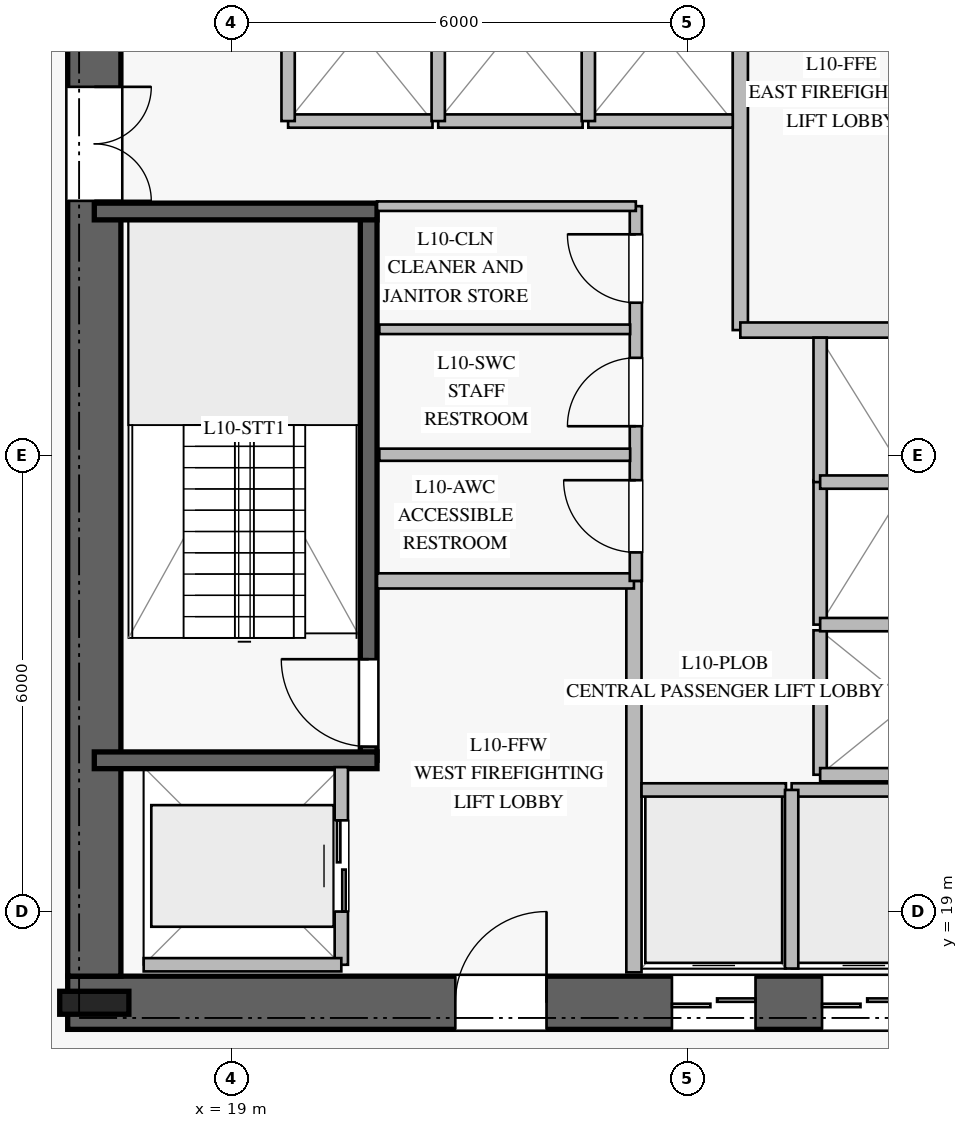
"""IFC4 building model, lengths in metres.
Left out: names, types, materials, properties, quantities, classifications, styles, units other than length and angle.
Written with IfcOpenShell. Run it as: python <this file> out.ifc"""

import sys

from ifc_helpers import new_model, si_unit, direction, frame, frame_2d, origin, origin_2d, place, context, subcontext, project, spatial, rectangle, i_section, extrude, element, fill, save


model = new_model("IFC4")
c1 = context("Model", 3, precision=1e-05, world=origin(), true_north=direction((0.0, 1.0)))
c2 = subcontext(c1, "Body", "Model", "MODEL_VIEW")
j1 = project(units=[si_unit("LENGTHUNIT", "METRE"), si_unit("PLANEANGLEUNIT", "RADIAN")], contexts=[c1])
p1 = place(None, origin())
s1 = spatial("IfcSite", under=j1, at=p1, CompositionType="ELEMENT")
p2 = place(p1, origin())
s2 = spatial("IfcBuilding", under=s1, at=p2, CompositionType="ELEMENT")
p3 = place(p2, frame((0.0, 0.0, 44.0)))
s3 = spatial("IfcBuildingStorey", under=s2, at=p3, CompositionType="ELEMENT", Elevation=44.0)
p4 = place(p3, frame((16.85, 17.8, 0.0), z_axis=(0.0, 0.0, 1.0), x_axis=(1.0, 0.0, 0.0)))
e1 = element("IfcWall", 1, at=p4, inside=s3, PredefinedType="SHEAR", context=c2, shape_type="SweptSolid", body=[
    extrude(rectangle(XDim=16.3, YDim=0.7, at=frame_2d((8.15, 0.0))), origin(), (0.0, 0.0, 1.0), 3.76),
])
p5 = place(p4, frame((5.1, 0.0, 0.0)))
e2 = element("IfcOpeningElement", 2, at=p5, cuts=e1, PredefinedType="OPENING", context=c2, shape_type="SweptSolid", body=[
    extrude(rectangle(XDim=1.2, YDim=2.25, at=frame_2d((0.6, 1.125))), frame((0.0, 0.36, 0.0), z_axis=(0.0, -1.0, 0.0), x_axis=(1.0, 0.0, 0.0)), (0.0, 0.0, 1.0), 0.72),
])
p6 = place(p4, frame((14.05, 0.0, 0.0)))
e3 = element("IfcOpeningElement", 3, at=p6, cuts=e1, PredefinedType="OPENING", context=c2, shape_type="SweptSolid", body=[
    extrude(rectangle(XDim=0.9, YDim=2.1, at=frame_2d((0.45, 1.05))), frame((0.0, 0.36, 0.0), z_axis=(0.0, -1.0, 0.0), x_axis=(1.0, 0.0, 0.0)), (0.0, 0.0, 1.0), 0.72),
])
p7 = place(p4, frame((7.95, 0.0, 0.0)))
e4 = element("IfcOpeningElement", 4, at=p7, cuts=e1, PredefinedType="OPENING", context=c2, shape_type="SweptSolid", body=[
    extrude(rectangle(XDim=1.1, YDim=2.2, at=frame_2d((0.55, 1.1))), frame((0.0, 0.36, 0.0), z_axis=(0.0, -1.0, 0.0), x_axis=(1.0, 0.0, 0.0)), (0.0, 0.0, 1.0), 0.72),
])
p8 = place(p4, frame((9.925, 0.0, 0.0)))
e5 = element("IfcOpeningElement", 5, at=p8, cuts=e1, PredefinedType="OPENING", context=c2, shape_type="SweptSolid", body=[
    extrude(rectangle(XDim=1.1, YDim=2.2, at=frame_2d((0.55, 1.1))), frame((0.0, 0.36, 0.0), z_axis=(0.0, -1.0, 0.0), x_axis=(1.0, 0.0, 0.0)), (0.0, 0.0, 1.0), 0.72),
])
p9 = place(p4, frame((11.9, 0.0, 0.0)))
e6 = element("IfcOpeningElement", 6, at=p9, cuts=e1, PredefinedType="OPENING", context=c2, shape_type="SweptSolid", body=[
    extrude(rectangle(XDim=1.1, YDim=2.2, at=frame_2d((0.55, 1.1))), frame((0.0, 0.36, 0.0), z_axis=(0.0, -1.0, 0.0), x_axis=(1.0, 0.0, 0.0)), (0.0, 0.0, 1.0), 0.72),
])
p10 = place(p3, frame((17.2, 31.85, 0.0), z_axis=(0.0, 0.0, 1.0), x_axis=(0.0, -1.0, 0.0)))
e7 = element("IfcWall", 7, at=p10, inside=s3, PredefinedType="SHEAR", context=c2, shape_type="SweptSolid", body=[
    extrude(rectangle(XDim=13.7, YDim=0.7, at=frame_2d((6.85, 0.0))), origin(), (0.0, 0.0, 1.0), 3.76),
])
p11 = place(p10, frame((2.0, 0.0, 0.0)))
e8 = element("IfcOpeningElement", 8, at=p11, cuts=e7, PredefinedType="OPENING", context=c2, shape_type="SweptSolid", body=[
    extrude(rectangle(XDim=1.5, YDim=2.2, at=frame_2d((0.75, 1.1))), frame((0.0, 0.36, 0.0), z_axis=(0.0, -1.0, 0.0), x_axis=(1.0, 0.0, 0.0)), (0.0, 0.0, 1.0), 0.72),
])
p12 = place(p3, frame((17.2, 17.8, 0.0), z_axis=(0.0, 0.0, 1.0), x_axis=(1.0, 0.0, 0.0)))
e9 = element("IfcColumn", 9, at=p12, inside=s3, PredefinedType="COLUMN", context=c2, shape_type="SweptSolid", body=[
    extrude(i_section(OverallWidth=0.302, OverallDepth=0.91, WebThickness=0.021, FlangeThickness=0.04, at=origin_2d()), origin(), (0.0, 0.0, 1.0), 4.0),
])
p13 = place(p3, frame((20.81, 20.99, 0.0), z_axis=(0.0, 0.0, 1.0), x_axis=(0.0, 1.0, 0.0)))
e10 = element("IfcWall", 10, at=p13, inside=s3, PredefinedType="SOLIDWALL", context=c2, shape_type="SweptSolid", body=[
    extrude(rectangle(XDim=7.22, YDim=0.22, at=frame_2d((3.61, 0.0))), origin(), (0.0, 0.0, 1.0), 3.76),
])
p14 = place(p13, frame((0.18, 0.0, 0.0)))
e11 = element("IfcOpeningElement", 11, at=p14, cuts=e10, PredefinedType="OPENING", context=c2, shape_type="SweptSolid", body=[
    extrude(rectangle(XDim=1.15, YDim=2.2, at=frame_2d((0.575, 1.1))), frame((0.0, 0.12, 0.0), z_axis=(0.0, -1.0, 0.0), x_axis=(1.0, 0.0, 0.0)), (0.0, 0.0, 1.0), 0.24),
])
for number, where, z_axis, x_axis in (
    (12, (17.2, 20.99, 0.0), (0.0, 0.0, 1.0), (1.0, 0.0, 0.0)),
    (13, (17.2, 28.21, 0.0), (0.0, 0.0, 1.0), (1.0, 0.0, 0.0)),
):
    element("IfcWall", number, at=place(p3, frame(where, z_axis=z_axis, x_axis=x_axis)), inside=s3, PredefinedType="SOLIDWALL", context=c2, shape_type="SweptSolid", body=[
        extrude(rectangle(XDim=3.72, YDim=0.22, at=frame_2d((1.86, 0.0))), origin(), (0.0, 0.0, 1.0), 3.76),
    ])
p15 = place(p3, frame((24.3, 18.2, 0.0), z_axis=(0.0, 0.0, 1.0), x_axis=(0.0, 1.0, 0.0)))
e14 = element("IfcWall", 14, at=p15, inside=s3, PredefinedType="PARTITIONING", context=c2, shape_type="SweptSolid", body=[
    extrude(rectangle(XDim=5.15, YDim=0.2, at=frame_2d((2.575, 0.0))), origin(), (0.0, 0.0, 1.0), 3.76),
])
p16 = place(p3, frame((20.92, 23.35, 0.0), z_axis=(0.0, 0.0, 1.0), x_axis=(1.0, 0.0, 0.0)))
e15 = element("IfcWall", 15, at=p16, inside=s3, PredefinedType="PARTITIONING", context=c2, shape_type="SweptSolid", body=[
    extrude(rectangle(XDim=3.38, YDim=0.2, at=frame_2d((1.69, 0.0))), origin(), (0.0, 0.0, 1.0), 3.76),
])
p17 = place(p3, frame((25.7, 26.65, 0.0), z_axis=(0.0, 0.0, 1.0), x_axis=(0.0, 1.0, 0.0)))
e16 = element("IfcWall", 16, at=p17, inside=s3, PredefinedType="PARTITIONING", context=c2, shape_type="SweptSolid", body=[
    extrude(rectangle(XDim=5.15, YDim=0.2, at=frame_2d((2.575, 0.0))), origin(), (0.0, 0.0, 1.0), 3.76),
])
p18 = place(p3, frame((25.7, 26.65, 0.0), z_axis=(0.0, 0.0, 1.0), x_axis=(1.0, 0.0, 0.0)))
e17 = element("IfcWall", 17, at=p18, inside=s3, PredefinedType="PARTITIONING", context=c2, shape_type="SweptSolid", body=[
    extrude(rectangle(XDim=3.38, YDim=0.2, at=frame_2d((1.69, 0.0))), origin(), (0.0, 0.0, 1.0), 3.76),
])
p19 = place(p3, frame((24.325, 23.35, 0.0), z_axis=(0.0, 0.0, 1.0), x_axis=(0.0, 1.0, 0.0)))
e18 = element("IfcWall", 18, at=p19, inside=s3, PredefinedType="PLUMBINGWALL", context=c2, shape_type="SweptSolid", body=[
    extrude(rectangle(XDim=4.93, YDim=0.16, at=frame_2d((2.465, 0.0))), origin(), (0.0, 0.0, 1.0), 3.76),
])
p20 = place(p19, frame((0.375, 0.0, 0.0)))
e19 = element("IfcOpeningElement", 19, at=p20, cuts=e18, PredefinedType="OPENING", context=c2, shape_type="SweptSolid", body=[
    extrude(rectangle(XDim=0.95, YDim=2.1, at=frame_2d((0.475, 1.05))), frame((0.0, 0.09, 0.0), z_axis=(0.0, -1.0, 0.0), x_axis=(1.0, 0.0, 0.0)), (0.0, 0.0, 1.0), 0.18),
])
p21 = place(p19, frame((2.035, 0.0, 0.0)))
e20 = element("IfcOpeningElement", 20, at=p21, cuts=e18, PredefinedType="OPENING", context=c2, shape_type="SweptSolid", body=[
    extrude(rectangle(XDim=0.9, YDim=2.1, at=frame_2d((0.45, 1.05))), frame((0.0, 0.09, 0.0), z_axis=(0.0, -1.0, 0.0), x_axis=(1.0, 0.0, 0.0)), (0.0, 0.0, 1.0), 0.18),
])
p22 = place(p19, frame((3.66, 0.0, 0.0)))
e21 = element("IfcOpeningElement", 21, at=p22, cuts=e18, PredefinedType="OPENING", context=c2, shape_type="SweptSolid", body=[
    extrude(rectangle(XDim=0.9, YDim=2.1, at=frame_2d((0.45, 1.05))), frame((0.0, 0.09, 0.0), z_axis=(0.0, -1.0, 0.0), x_axis=(1.0, 0.0, 0.0)), (0.0, 0.0, 1.0), 0.18),
])
p23 = place(p3, frame((20.92, 28.28, 0.0), z_axis=(0.0, 0.0, 1.0), x_axis=(1.0, 0.0, 0.0)))
e22 = element("IfcWall", 22, at=p23, inside=s3, PredefinedType="PARTITIONING", context=c2, shape_type="SweptSolid", body=[
    extrude(rectangle(XDim=3.405, YDim=0.125, at=frame_2d((1.703, 0.0))), origin(), (0.0, 0.0, 1.0), 3.76),
])
p24 = place(p3, frame((20.95, 25.01, 0.0), z_axis=(0.0, 0.0, 1.0), x_axis=(1.0, 0.0, 0.0)))
e23 = element("IfcWall", 23, at=p24, inside=s3, PredefinedType="PLUMBINGWALL", context=c2, shape_type="SweptSolid", body=[
    extrude(rectangle(XDim=3.3, YDim=0.16, at=frame_2d((1.65, 0.0))), origin(), (0.0, 0.0, 1.0), 3.76),
])
p25 = place(p3, frame((20.95, 26.66, 0.0), z_axis=(0.0, 0.0, 1.0), x_axis=(1.0, 0.0, 0.0)))
e24 = element("IfcWall", 24, at=p25, inside=s3, PredefinedType="PARTITIONING", context=c2, shape_type="SweptSolid", body=[
    extrude(rectangle(XDim=3.3, YDim=0.125, at=frame_2d((1.65, 0.0))), origin(), (0.0, 0.0, 1.0), 3.76),
])
p26 = place(p3, frame((24.4, 20.6, 0.0), z_axis=(0.0, 0.0, 1.0), x_axis=(1.0, 0.0, 0.0)))
e25 = element("IfcWall", 25, at=p26, inside=s3, PredefinedType="PARTITIONING", context=c2, shape_type="SweptSolid", body=[
    extrude(rectangle(XDim=1.9, YDim=0.175, at=frame_2d((0.95, 0.0))), origin(), (0.0, 0.0, 1.0), 3.76),
])
p27 = place(p3, frame((26.375, 20.6, 0.0), z_axis=(0.0, 0.0, 1.0), x_axis=(1.0, 0.0, 0.0)))
e26 = element("IfcWall", 26, at=p27, inside=s3, PredefinedType="PARTITIONING", context=c2, shape_type="SweptSolid", body=[
    extrude(rectangle(XDim=1.9, YDim=0.175, at=frame_2d((0.95, 0.0))), origin(), (0.0, 0.0, 1.0), 3.76),
])
p28 = place(p3, frame((26.375, 18.25, 0.0), z_axis=(0.0, 0.0, 1.0), x_axis=(0.0, 1.0, 0.0)))
e27 = element("IfcWall", 27, at=p28, inside=s3, PredefinedType="PARTITIONING", context=c2, shape_type="SweptSolid", body=[
    extrude(rectangle(XDim=2.35, YDim=0.175, at=frame_2d((1.175, 0.0))), origin(), (0.0, 0.0, 1.0), 3.76),
])
p29 = place(p3, frame((19.75, 29.4, 0.0), z_axis=(0.0, 0.0, 1.0), x_axis=(1.0, 0.0, 0.0)))
e28 = element("IfcWall", 28, at=p29, inside=s3, PredefinedType="PARTITIONING", context=c2, shape_type="SweptSolid", body=[
    extrude(rectangle(XDim=1.9, YDim=0.175, at=frame_2d((0.95, 0.0))), origin(), (0.0, 0.0, 1.0), 3.76),
])
p30 = place(p3, frame((19.75, 29.4, 0.0), z_axis=(0.0, 0.0, 1.0), x_axis=(0.0, 1.0, 0.0)))
e29 = element("IfcWall", 29, at=p30, inside=s3, PredefinedType="PARTITIONING", context=c2, shape_type="SweptSolid", body=[
    extrude(rectangle(XDim=2.35, YDim=0.175, at=frame_2d((1.175, 0.0))), origin(), (0.0, 0.0, 1.0), 3.76),
])
p31 = place(p3, frame((21.725, 29.4, 0.0), z_axis=(0.0, 0.0, 1.0), x_axis=(1.0, 0.0, 0.0)))
e30 = element("IfcWall", 30, at=p31, inside=s3, PredefinedType="PARTITIONING", context=c2, shape_type="SweptSolid", body=[
    extrude(rectangle(XDim=1.9, YDim=0.175, at=frame_2d((0.95, 0.0))), origin(), (0.0, 0.0, 1.0), 3.76),
])
p32 = place(p3, frame((21.725, 29.4, 0.0), z_axis=(0.0, 0.0, 1.0), x_axis=(0.0, 1.0, 0.0)))
e31 = element("IfcWall", 31, at=p32, inside=s3, PredefinedType="PARTITIONING", context=c2, shape_type="SweptSolid", body=[
    extrude(rectangle(XDim=2.35, YDim=0.175, at=frame_2d((1.175, 0.0))), origin(), (0.0, 0.0, 1.0), 3.76),
])
p33 = place(p3, frame((23.7, 29.4, 0.0), z_axis=(0.0, 0.0, 1.0), x_axis=(1.0, 0.0, 0.0)))
e32 = element("IfcWall", 32, at=p33, inside=s3, PredefinedType="PARTITIONING", context=c2, shape_type="SweptSolid", body=[
    extrude(rectangle(XDim=1.9, YDim=0.175, at=frame_2d((0.95, 0.0))), origin(), (0.0, 0.0, 1.0), 3.76),
])
p34 = place(p3, frame((23.7, 29.4, 0.0), z_axis=(0.0, 0.0, 1.0), x_axis=(0.0, 1.0, 0.0)))
e33 = element("IfcWall", 33, at=p34, inside=s3, PredefinedType="PARTITIONING", context=c2, shape_type="SweptSolid", body=[
    extrude(rectangle(XDim=2.35, YDim=0.175, at=frame_2d((1.175, 0.0))), origin(), (0.0, 0.0, 1.0), 3.76),
])
p35 = place(p3, frame((26.75, 20.8, 0.0), z_axis=(0.0, 0.0, 1.0), x_axis=(0.0, 1.0, 0.0)))
e34 = element("IfcWall", 34, at=p35, inside=s3, PredefinedType="PARTITIONING", context=c2, shape_type="SweptSolid", body=[
    extrude(rectangle(XDim=1.9, YDim=0.175, at=frame_2d((0.95, 0.0))), origin(), (0.0, 0.0, 1.0), 3.76),
])
p36 = place(p3, frame((26.75, 20.8, 0.0), z_axis=(0.0, 0.0, 1.0), x_axis=(1.0, 0.0, 0.0)))
e35 = element("IfcWall", 35, at=p36, inside=s3, PredefinedType="PARTITIONING", context=c2, shape_type="SweptSolid", body=[
    extrude(rectangle(XDim=2.35, YDim=0.175, at=frame_2d((1.175, 0.0))), origin(), (0.0, 0.0, 1.0), 3.76),
])
p37 = place(p3, frame((26.75, 22.775, 0.0), z_axis=(0.0, 0.0, 1.0), x_axis=(0.0, 1.0, 0.0)))
e36 = element("IfcWall", 36, at=p37, inside=s3, PredefinedType="PARTITIONING", context=c2, shape_type="SweptSolid", body=[
    extrude(rectangle(XDim=1.9, YDim=0.175, at=frame_2d((0.95, 0.0))), origin(), (0.0, 0.0, 1.0), 3.76),
])
p38 = place(p3, frame((26.75, 22.775, 0.0), z_axis=(0.0, 0.0, 1.0), x_axis=(1.0, 0.0, 0.0)))
e37 = element("IfcWall", 37, at=p38, inside=s3, PredefinedType="PARTITIONING", context=c2, shape_type="SweptSolid", body=[
    extrude(rectangle(XDim=2.35, YDim=0.175, at=frame_2d((1.175, 0.0))), origin(), (0.0, 0.0, 1.0), 3.76),
])
p39 = place(p3, frame((26.75, 24.65, 0.0), z_axis=(0.0, 0.0, 1.0), x_axis=(0.0, 1.0, 0.0)))
e38 = element("IfcWall", 38, at=p39, inside=s3, PredefinedType="PARTITIONING", context=c2, shape_type="SweptSolid", body=[
    extrude(rectangle(XDim=1.9, YDim=0.175, at=frame_2d((0.95, 0.0))), origin(), (0.0, 0.0, 1.0), 3.76),
])
p40 = place(p3, frame((26.75, 24.65, 0.0), z_axis=(0.0, 0.0, 1.0), x_axis=(1.0, 0.0, 0.0)))
e39 = element("IfcWall", 39, at=p40, inside=s3, PredefinedType="PARTITIONING", context=c2, shape_type="SweptSolid", body=[
    extrude(rectangle(XDim=2.35, YDim=0.175, at=frame_2d((1.175, 0.0))), origin(), (0.0, 0.0, 1.0), 3.76),
])
p41 = place(p3, frame((20.45, 18.3, 0.0), z_axis=(0.0, 0.0, 1.0), x_axis=(0.0, 1.0, 0.0)))
e40 = element("IfcWall", 40, at=p41, inside=s3, PredefinedType="PARTITIONING", context=c2, shape_type="SweptSolid", body=[
    extrude(rectangle(XDim=2.6, YDim=0.175, at=frame_2d((1.3, 0.0))), origin(), (0.0, 0.0, 1.0), 3.76),
])
p42 = place(p41, frame((0.7, 0.0, 0.0)))
e41 = element("IfcOpeningElement", 41, at=p42, cuts=e40, PredefinedType="OPENING", context=c2, shape_type="SweptSolid", body=[
    extrude(rectangle(XDim=1.2, YDim=2.2, at=frame_2d((0.6, 1.1))), frame((0.0, 0.098, 0.0), z_axis=(0.0, -1.0, 0.0), x_axis=(1.0, 0.0, 0.0)), (0.0, 0.0, 1.0), 0.195),
])
p43 = place(p3, frame((17.85, 18.3, 0.0), z_axis=(0.0, 0.0, 1.0), x_axis=(1.0, 0.0, 0.0)))
e42 = element("IfcWall", 42, at=p43, inside=s3, PredefinedType="PARTITIONING", context=c2, shape_type="SweptSolid", body=[
    extrude(rectangle(XDim=2.6, YDim=0.175, at=frame_2d((1.3, 0.0))), origin(), (0.0, 0.0, 1.0), 3.76),
])
p44 = place(p14, origin())
e43 = element("IfcDoor", 43, at=p44, inside=s3, OperationType="SINGLE_SWING_RIGHT", PredefinedType="DOOR", context=c2, shape_type="SweptSolid", body=[
    extrude(rectangle(XDim=1.15, YDim=2.2, at=frame_2d((0.575, 1.1))), frame((0.0, 0.025, 0.0), z_axis=(0.0, -1.0, 0.0), x_axis=(1.0, 0.0, 0.0)), (0.0, 0.0, 1.0), 0.05),
])
fill(e11, e43)
p45 = place(p5, origin())
e44 = element("IfcDoor", 44, at=p45, inside=s3, OperationType="SINGLE_SWING_RIGHT", PredefinedType="DOOR", context=c2, shape_type="SweptSolid", body=[
    extrude(rectangle(XDim=1.2, YDim=2.25, at=frame_2d((0.6, 1.125))), frame((0.0, 0.025, 0.0), z_axis=(0.0, -1.0, 0.0), x_axis=(1.0, 0.0, 0.0)), (0.0, 0.0, 1.0), 0.05),
])
fill(e2, e44)
p46 = place(p11, origin())
e45 = element("IfcDoor", 45, at=p46, inside=s3, OperationType="DOUBLE_DOOR_SINGLE_SWING", PredefinedType="DOOR", context=c2, shape_type="SweptSolid", body=[
    extrude(rectangle(XDim=1.5, YDim=2.2, at=frame_2d((0.75, 1.1))), frame((0.0, 0.025, 0.0), z_axis=(0.0, -1.0, 0.0), x_axis=(1.0, 0.0, 0.0)), (0.0, 0.0, 1.0), 0.05),
])
fill(e8, e45)
p47 = place(p20, origin())
e46 = element("IfcDoor", 46, at=p47, inside=s3, OperationType="SINGLE_SWING_RIGHT", PredefinedType="DOOR", context=c2, shape_type="SweptSolid", body=[
    extrude(rectangle(XDim=0.95, YDim=2.1, at=frame_2d((0.475, 1.05))), frame((0.0, 0.025, 0.0), z_axis=(0.0, -1.0, 0.0), x_axis=(1.0, 0.0, 0.0)), (0.0, 0.0, 1.0), 0.05),
])
fill(e19, e46)
p48 = place(p21, origin())
e47 = element("IfcDoor", 47, at=p48, inside=s3, OperationType="SINGLE_SWING_LEFT", PredefinedType="DOOR", context=c2, shape_type="SweptSolid", body=[
    extrude(rectangle(XDim=0.9, YDim=2.1, at=frame_2d((0.45, 1.05))), frame((0.0, 0.025, 0.0), z_axis=(0.0, -1.0, 0.0), x_axis=(1.0, 0.0, 0.0)), (0.0, 0.0, 1.0), 0.05),
])
fill(e20, e47)
p49 = place(p22, origin())
e48 = element("IfcDoor", 48, at=p49, inside=s3, OperationType="SINGLE_SWING_RIGHT", PredefinedType="DOOR", context=c2, shape_type="SweptSolid", body=[
    extrude(rectangle(XDim=0.9, YDim=2.1, at=frame_2d((0.45, 1.05))), frame((0.0, 0.025, 0.0), z_axis=(0.0, -1.0, 0.0), x_axis=(1.0, 0.0, 0.0)), (0.0, 0.0, 1.0), 0.05),
])
fill(e21, e48)
p50 = place(p7, origin())
e49 = element("IfcDoor", 49, at=p50, inside=s3, OperationType="DOUBLE_DOOR_SLIDING", PredefinedType="DOOR", context=c2, shape_type="SweptSolid", body=[
    extrude(rectangle(XDim=1.1, YDim=2.2, at=frame_2d((0.55, 1.1))), frame((0.0, 0.025, 0.0), z_axis=(0.0, -1.0, 0.0), x_axis=(1.0, 0.0, 0.0)), (0.0, 0.0, 1.0), 0.05),
])
fill(e4, e49)
p51 = place(p8, origin())
e50 = element("IfcDoor", 50, at=p51, inside=s3, OperationType="DOUBLE_DOOR_SLIDING", PredefinedType="DOOR", context=c2, shape_type="SweptSolid", body=[
    extrude(rectangle(XDim=1.1, YDim=2.2, at=frame_2d((0.55, 1.1))), frame((0.0, 0.025, 0.0), z_axis=(0.0, -1.0, 0.0), x_axis=(1.0, 0.0, 0.0)), (0.0, 0.0, 1.0), 0.05),
])
fill(e5, e50)
p52 = place(p42, origin())
e51 = element("IfcDoor", 51, at=p52, inside=s3, OperationType="DOUBLE_DOOR_SLIDING", PredefinedType="DOOR", context=c2, shape_type="SweptSolid", body=[
    extrude(rectangle(XDim=1.2, YDim=2.2, at=frame_2d((0.6, 1.1))), frame((0.0, 0.025, 0.0), z_axis=(0.0, -1.0, 0.0), x_axis=(1.0, 0.0, 0.0)), (0.0, 0.0, 1.0), 0.05),
])
fill(e41, e51)
save(model, sys.argv[1])
